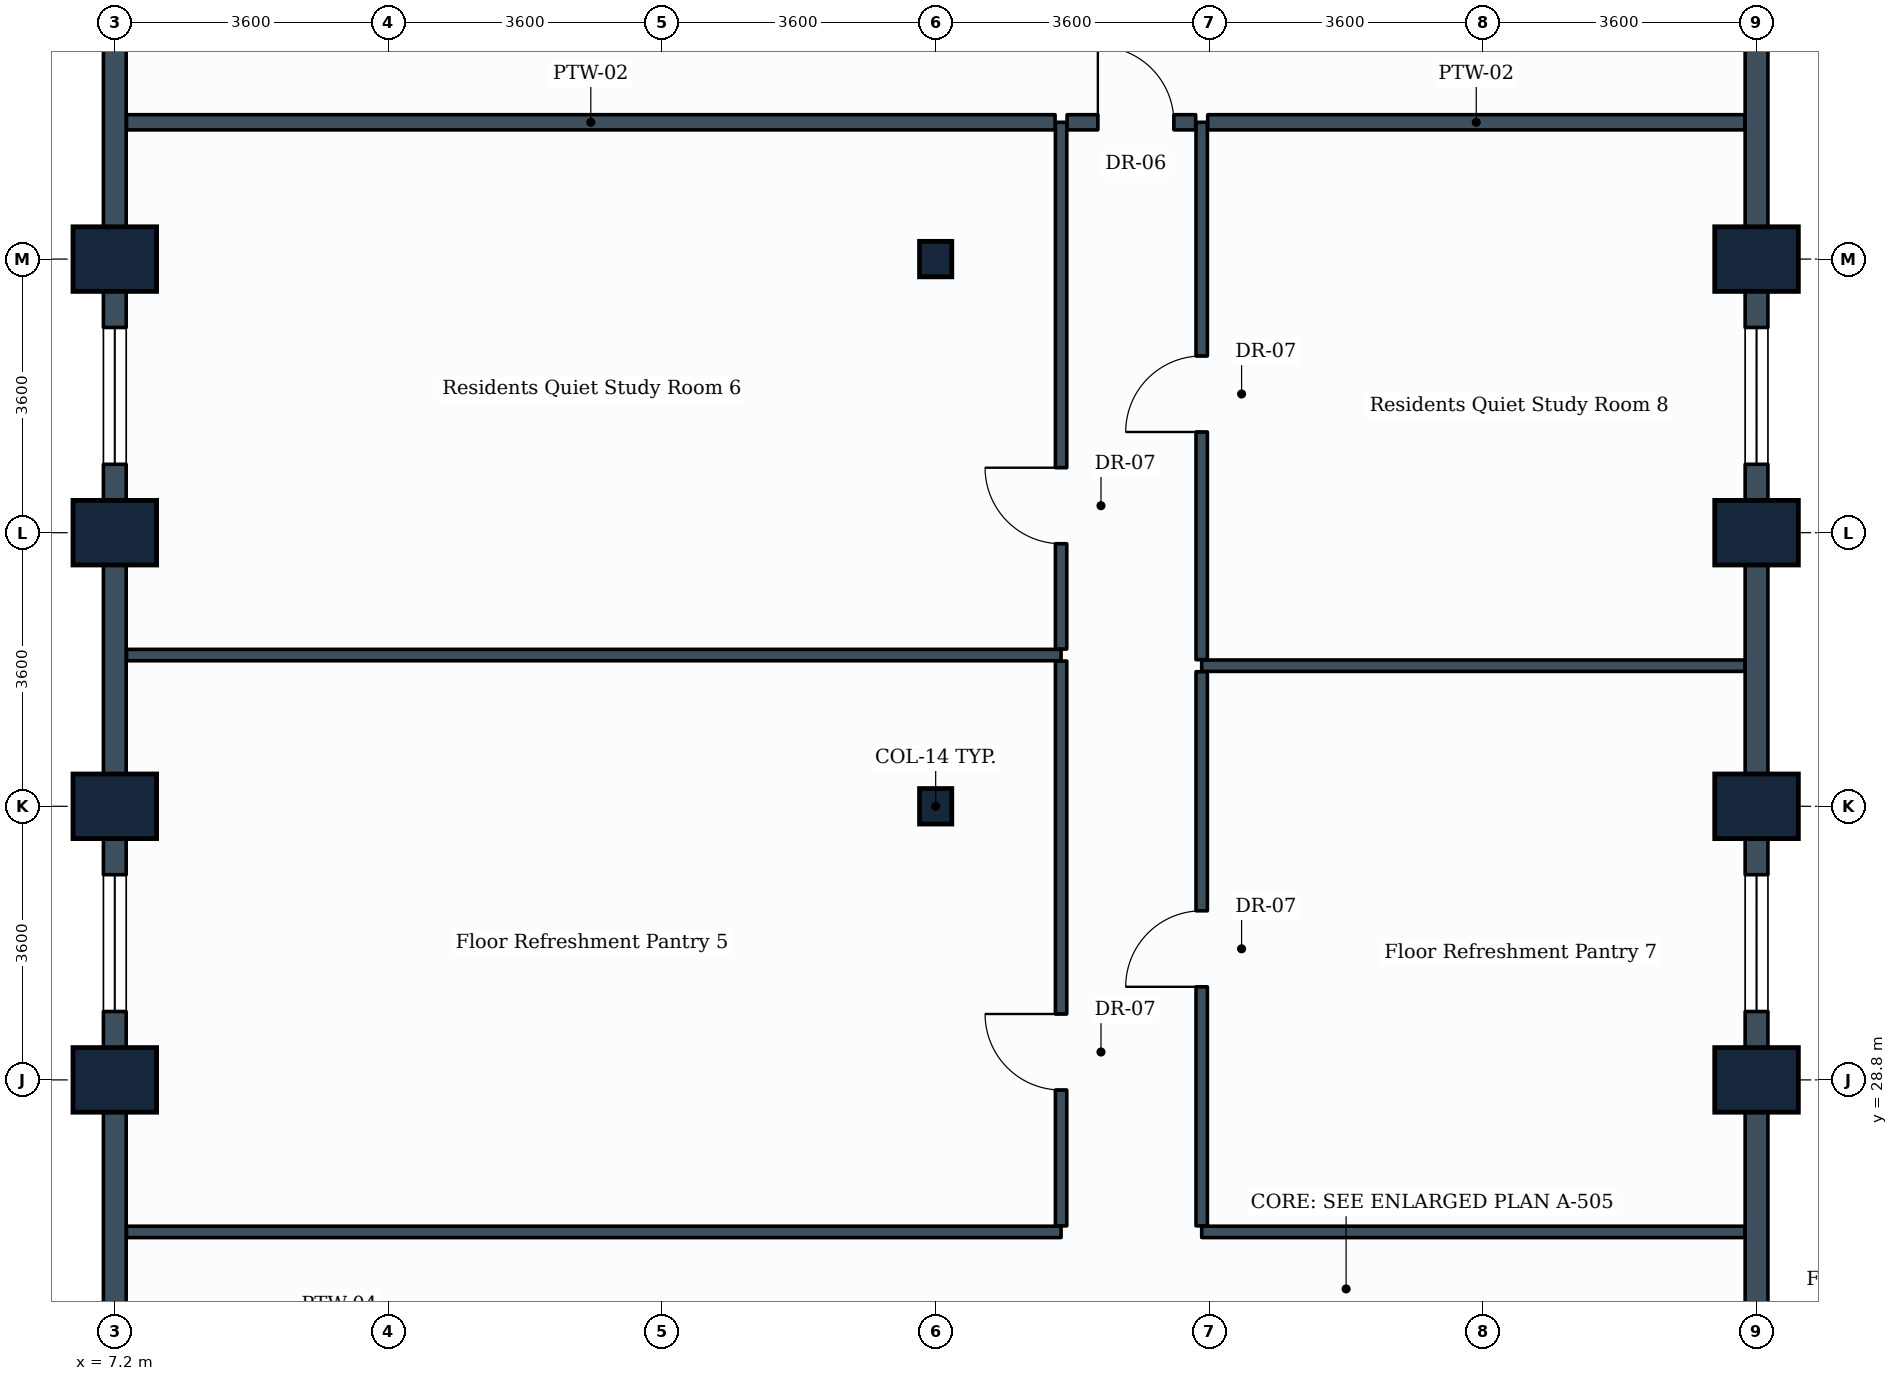
"""IFC4 building model, lengths in metres.
Left out: names, types, materials, properties, quantities, classifications, styles, units other than length and angle.
Written with IfcOpenShell. Run it as: python <this file> out.ifc"""

import sys

from ifc_helpers import new_model, si_unit, direction, frame, frame_2d, origin, origin_2d, place, context, subcontext, project, spatial, rectangle, i_section, extrude, element, fill, save


model = new_model("IFC4")
c1 = context("Model", 3, precision=1e-05, world=origin(), true_north=direction((0.0, 1.0)))
c2 = subcontext(c1, "Body", "Model", "MODEL_VIEW")
j1 = project(units=[si_unit("LENGTHUNIT", "METRE"), si_unit("PLANEANGLEUNIT", "RADIAN")], contexts=[c1])
p1 = place(None, origin())
s1 = spatial("IfcSite", under=j1, at=p1, CompositionType="ELEMENT")
p2 = place(p1, origin())
s2 = spatial("IfcBuilding", under=s1, at=p2, CompositionType="ELEMENT")
p3 = place(p2, frame((0.0, 0.0, 95.7)))
s3 = spatial("IfcBuildingStorey", under=s2, at=p3, CompositionType="ELEMENT", Elevation=95.7)
for number, where, z_axis, x_axis in (
    (1, (7.2, 28.8, 0.0), (0.0, 0.0, 1.0), (0.0, 1.0, 0.0)),
    (2, (7.2, 32.4, 0.0), (0.0, 0.0, 1.0), (0.0, 1.0, 0.0)),
    (3, (7.2, 36.0, 0.0), (0.0, 0.0, 1.0), (0.0, 1.0, 0.0)),
    (4, (7.2, 39.6, 0.0), (0.0, 0.0, 1.0), (0.0, 1.0, 0.0)),
):
    element("IfcColumn", number, at=place(p3, frame(where, z_axis=z_axis, x_axis=x_axis)), inside=s3, PredefinedType="COLUMN", context=c2, shape_type="SweptSolid", body=[
        extrude(rectangle(XDim=0.85, YDim=1.1, at=origin_2d()), origin(), (0.0, 0.0, 1.0), 3.9),
    ])
for number, where, z_axis, x_axis in (
    (5, (18.0, 32.4, 0.0), (0.0, 0.0, 1.0), (1.0, 0.0, 0.0)),
    (6, (18.0, 39.6, 0.0), (0.0, 0.0, 1.0), (1.0, 0.0, 0.0)),
):
    element("IfcColumn", number, at=place(p3, frame(where, z_axis=z_axis, x_axis=x_axis)), inside=s3, PredefinedType="COLUMN", context=c2, shape_type="SweptSolid", body=[
        extrude(i_section(OverallWidth=0.424, OverallDepth=0.467, WebThickness=0.033, FlangeThickness=0.053, FilletRadius=0.015, at=origin_2d()), origin(), (0.0, 0.0, 1.0), 3.9),
    ])
for number, where, z_axis, x_axis in (
    (7, (28.8, 28.8, 0.0), (0.0, 0.0, 1.0), (0.0, 1.0, 0.0)),
    (8, (28.8, 32.4, 0.0), (0.0, 0.0, 1.0), (0.0, 1.0, 0.0)),
    (9, (28.8, 36.0, 0.0), (0.0, 0.0, 1.0), (0.0, 1.0, 0.0)),
    (10, (28.8, 39.6, 0.0), (0.0, 0.0, 1.0), (0.0, 1.0, 0.0)),
):
    element("IfcColumn", number, at=place(p3, frame(where, z_axis=z_axis, x_axis=x_axis)), inside=s3, PredefinedType="COLUMN", context=c2, shape_type="SweptSolid", body=[
        extrude(rectangle(XDim=0.85, YDim=1.1, at=origin_2d()), origin(), (0.0, 0.0, 1.0), 3.9),
    ])
p4 = place(p3, frame((28.8, 28.8, 0.0), z_axis=(0.0, 0.0, 1.0), x_axis=(0.0, -1.0, 0.0)))
e11 = element("IfcWall", 11, at=p4, inside=s3, PredefinedType="STANDARD", context=c2, shape_type="SweptSolid", body=[
    extrude(rectangle(XDim=3.6, YDim=0.3, at=frame_2d((1.8, 0.0))), origin(), (0.0, 0.0, 1.0), 3.19),
])
p5 = place(p3, frame((28.8, 32.4, 0.0), z_axis=(0.0, 0.0, 1.0), x_axis=(0.0, -1.0, 0.0)))
e12 = element("IfcWall", 12, at=p5, inside=s3, PredefinedType="STANDARD", context=c2, shape_type="SweptSolid", body=[
    extrude(rectangle(XDim=3.6, YDim=0.3, at=frame_2d((1.8, 0.0))), origin(), (0.0, 0.0, 1.0), 2.93),
])
p6 = place(p5, frame((0.9, 0.0, 0.85)))
e13 = element("IfcOpeningElement", 13, at=p6, cuts=e12, PredefinedType="OPENING", context=c2, shape_type="SweptSolid", body=[
    extrude(rectangle(XDim=1.8, YDim=1.35, at=frame_2d((0.9, 0.675))), frame((0.0, 0.16, 0.0), z_axis=(0.0, -1.0, 0.0), x_axis=(1.0, 0.0, 0.0)), (0.0, 0.0, 1.0), 0.32),
])
p7 = place(p3, frame((28.8, 36.0, 0.0), z_axis=(0.0, 0.0, 1.0), x_axis=(0.0, -1.0, 0.0)))
e14 = element("IfcWall", 14, at=p7, inside=s3, PredefinedType="STANDARD", context=c2, shape_type="SweptSolid", body=[
    extrude(rectangle(XDim=3.6, YDim=0.3, at=frame_2d((1.8, 0.0))), origin(), (0.0, 0.0, 1.0), 2.93),
])
p8 = place(p3, frame((28.8, 39.6, 0.0), z_axis=(0.0, 0.0, 1.0), x_axis=(0.0, -1.0, 0.0)))
e15 = element("IfcWall", 15, at=p8, inside=s3, PredefinedType="STANDARD", context=c2, shape_type="SweptSolid", body=[
    extrude(rectangle(XDim=3.6, YDim=0.3, at=frame_2d((1.8, 0.0))), origin(), (0.0, 0.0, 1.0), 2.93),
])
p9 = place(p8, frame((0.9, 0.0, 0.85)))
e16 = element("IfcOpeningElement", 16, at=p9, cuts=e15, PredefinedType="OPENING", context=c2, shape_type="SweptSolid", body=[
    extrude(rectangle(XDim=1.8, YDim=1.35, at=frame_2d((0.9, 0.675))), frame((0.0, 0.16, 0.0), z_axis=(0.0, -1.0, 0.0), x_axis=(1.0, 0.0, 0.0)), (0.0, 0.0, 1.0), 0.32),
])
for number, where, z_axis, x_axis in (
    (17, (28.8, 43.2, 0.0), (0.0, 0.0, 1.0), (0.0, -1.0, 0.0)),
    (18, (7.2, 39.6, 0.0), (0.0, 0.0, 1.0), (0.0, 1.0, 0.0)),
):
    element("IfcWall", number, at=place(p3, frame(where, z_axis=z_axis, x_axis=x_axis)), inside=s3, PredefinedType="STANDARD", context=c2, shape_type="SweptSolid", body=[
        extrude(rectangle(XDim=3.6, YDim=0.3, at=frame_2d((1.8, 0.0))), origin(), (0.0, 0.0, 1.0), 2.93),
    ])
p10 = place(p3, frame((7.2, 36.0, 0.0), z_axis=(0.0, 0.0, 1.0), x_axis=(0.0, 1.0, 0.0)))
e19 = element("IfcWall", 19, at=p10, inside=s3, PredefinedType="STANDARD", context=c2, shape_type="SweptSolid", body=[
    extrude(rectangle(XDim=3.6, YDim=0.3, at=frame_2d((1.8, 0.0))), origin(), (0.0, 0.0, 1.0), 2.93),
])
p11 = place(p10, frame((0.9, 0.0, 0.85)))
e20 = element("IfcOpeningElement", 20, at=p11, cuts=e19, PredefinedType="OPENING", context=c2, shape_type="SweptSolid", body=[
    extrude(rectangle(XDim=1.8, YDim=1.35, at=frame_2d((0.9, 0.675))), frame((0.0, 0.16, 0.0), z_axis=(0.0, -1.0, 0.0), x_axis=(1.0, 0.0, 0.0)), (0.0, 0.0, 1.0), 0.32),
])
p12 = place(p3, frame((7.2, 32.4, 0.0), z_axis=(0.0, 0.0, 1.0), x_axis=(0.0, 1.0, 0.0)))
e21 = element("IfcWall", 21, at=p12, inside=s3, PredefinedType="STANDARD", context=c2, shape_type="SweptSolid", body=[
    extrude(rectangle(XDim=3.6, YDim=0.3, at=frame_2d((1.8, 0.0))), origin(), (0.0, 0.0, 1.0), 2.93),
])
p13 = place(p3, frame((7.2, 28.8, 0.0), z_axis=(0.0, 0.0, 1.0), x_axis=(0.0, 1.0, 0.0)))
e22 = element("IfcWall", 22, at=p13, inside=s3, PredefinedType="STANDARD", context=c2, shape_type="SweptSolid", body=[
    extrude(rectangle(XDim=3.6, YDim=0.3, at=frame_2d((1.8, 0.0))), origin(), (0.0, 0.0, 1.0), 2.93),
])
p14 = place(p13, frame((0.9, 0.0, 0.85)))
e23 = element("IfcOpeningElement", 23, at=p14, cuts=e22, PredefinedType="OPENING", context=c2, shape_type="SweptSolid", body=[
    extrude(rectangle(XDim=1.8, YDim=1.35, at=frame_2d((0.9, 0.675))), frame((0.0, 0.16, 0.0), z_axis=(0.0, -1.0, 0.0), x_axis=(1.0, 0.0, 0.0)), (0.0, 0.0, 1.0), 0.32),
])
p15 = place(p3, frame((7.2, 25.2, 0.0), z_axis=(0.0, 0.0, 1.0), x_axis=(0.0, 1.0, 0.0)))
e24 = element("IfcWall", 24, at=p15, inside=s3, PredefinedType="STANDARD", context=c2, shape_type="SweptSolid", body=[
    extrude(rectangle(XDim=3.6, YDim=0.3, at=frame_2d((1.8, 0.0))), origin(), (0.0, 0.0, 1.0), 2.93),
])
for number, where, z_axis, x_axis in (
    (25, (7.354, 26.8, 0.0), (0.0, 0.0, 1.0), (1.0, 0.0, 0.0)),
    (26, (7.354, 34.39, 0.0), (0.0, 0.0, 1.0), (1.0, 0.0, 0.0)),
):
    element("IfcWall", number, at=place(p3, frame(where, z_axis=z_axis, x_axis=x_axis)), inside=s3, PredefinedType="PARTITIONING", context=c2, shape_type="SweptSolid", body=[
        extrude(rectangle(XDim=12.296, YDim=0.15, at=frame_2d((6.148, 0.0))), origin(), (0.0, 0.0, 1.0), 2.93),
    ])
p16 = place(p3, frame((19.65, 26.879, 0.0), z_axis=(0.0, 0.0, 1.0), x_axis=(0.0, 1.0, 0.0)))
e27 = element("IfcWall", 27, at=p16, inside=s3, PredefinedType="PARTITIONING", context=c2, shape_type="SweptSolid", body=[
    extrude(rectangle(XDim=7.432, YDim=0.15, at=frame_2d((3.716, 0.0))), origin(), (0.0, 0.0, 1.0), 3.19),
])
p17 = place(p16, frame((1.788, 0.0, 0.0)))
e28 = element("IfcOpeningElement", 28, at=p17, cuts=e27, PredefinedType="OPENING", context=c2, shape_type="SweptSolid", body=[
    extrude(rectangle(XDim=1.0, YDim=2.1, at=frame_2d((0.5, 1.05))), frame((0.0, 0.085, 0.0), z_axis=(0.0, -1.0, 0.0), x_axis=(1.0, 0.0, 0.0)), (0.0, 0.0, 1.0), 0.17),
])
p18 = place(p3, frame((19.65, 34.469, 0.0), z_axis=(0.0, 0.0, 1.0), x_axis=(0.0, 1.0, 0.0)))
e29 = element("IfcWall", 29, at=p18, inside=s3, PredefinedType="PARTITIONING", context=c2, shape_type="SweptSolid", body=[
    extrude(rectangle(XDim=6.931, YDim=0.15, at=frame_2d((3.465, 0.0))), origin(), (0.0, 0.0, 1.0), 3.19),
])
p19 = place(p18, frame((1.386, 0.0, 0.0)))
e30 = element("IfcOpeningElement", 30, at=p19, cuts=e29, PredefinedType="OPENING", context=c2, shape_type="SweptSolid", body=[
    extrude(rectangle(XDim=1.0, YDim=2.1, at=frame_2d((0.5, 1.05))), frame((0.0, 0.085, 0.0), z_axis=(0.0, -1.0, 0.0), x_axis=(1.0, 0.0, 0.0)), (0.0, 0.0, 1.0), 0.17),
])
p20 = place(p3, frame((21.5, 26.8, 0.0), z_axis=(0.0, 0.0, 1.0), x_axis=(1.0, 0.0, 0.0)))
e31 = element("IfcWall", 31, at=p20, inside=s3, PredefinedType="PARTITIONING", context=c2, shape_type="SweptSolid", body=[
    extrude(rectangle(XDim=7.146, YDim=0.15, at=frame_2d((3.573, 0.0))), origin(), (0.0, 0.0, 1.0), 3.635),
])
p21 = place(p3, frame((21.5, 34.25, 0.0), z_axis=(0.0, 0.0, 1.0), x_axis=(1.0, 0.0, 0.0)))
e32 = element("IfcWall", 32, at=p21, inside=s3, PredefinedType="PARTITIONING", context=c2, shape_type="SweptSolid", body=[
    extrude(rectangle(XDim=7.146, YDim=0.15, at=frame_2d((3.573, 0.0))), origin(), (0.0, 0.0, 1.0), 2.93),
])
p22 = place(p3, frame((21.5, 26.879, 0.0), z_axis=(0.0, 0.0, 1.0), x_axis=(0.0, 1.0, 0.0)))
e33 = element("IfcWall", 33, at=p22, inside=s3, PredefinedType="PARTITIONING", context=c2, shape_type="SweptSolid", body=[
    extrude(rectangle(XDim=7.292, YDim=0.15, at=frame_2d((3.646, 0.0))), origin(), (0.0, 0.0, 1.0), 3.19),
])
p23 = place(p22, frame((3.146, 0.0, 0.0)))
e34 = element("IfcOpeningElement", 34, at=p23, cuts=e33, PredefinedType="OPENING", context=c2, shape_type="SweptSolid", body=[
    extrude(rectangle(XDim=1.0, YDim=2.1, at=frame_2d((0.5, 1.05))), frame((0.0, 0.085, 0.0), z_axis=(0.0, -1.0, 0.0), x_axis=(1.0, 0.0, 0.0)), (0.0, 0.0, 1.0), 0.17),
])
p24 = place(p3, frame((21.5, 34.329, 0.0), z_axis=(0.0, 0.0, 1.0), x_axis=(0.0, 1.0, 0.0)))
e35 = element("IfcWall", 35, at=p24, inside=s3, PredefinedType="PARTITIONING", context=c2, shape_type="SweptSolid", body=[
    extrude(rectangle(XDim=7.071, YDim=0.15, at=frame_2d((3.535, 0.0))), origin(), (0.0, 0.0, 1.0), 3.18),
])
p25 = place(p24, frame((2.996, 0.0, 0.0)))
e36 = element("IfcOpeningElement", 36, at=p25, cuts=e35, PredefinedType="OPENING", context=c2, shape_type="SweptSolid", body=[
    extrude(rectangle(XDim=1.0, YDim=2.1, at=frame_2d((0.5, 1.05))), frame((0.0, 0.085, 0.0), z_axis=(0.0, -1.0, 0.0), x_axis=(1.0, 0.0, 0.0)), (0.0, 0.0, 1.0), 0.17),
])
p26 = place(p3, frame((7.354, 41.4, 0.0), z_axis=(0.0, 0.0, 1.0), x_axis=(1.0, 0.0, 0.0)))
e37 = element("IfcWall", 37, at=p26, inside=s3, PredefinedType="PARTITIONING", context=c2, shape_type="SweptSolid", body=[
    extrude(rectangle(XDim=12.217, YDim=0.2, at=frame_2d((6.108, 0.0))), origin(), (0.0, 0.0, 1.0), 2.93),
])
p27 = place(p3, frame((21.579, 41.4, 0.0), z_axis=(0.0, 0.0, 1.0), x_axis=(1.0, 0.0, 0.0)))
e38 = element("IfcWall", 38, at=p27, inside=s3, PredefinedType="PARTITIONING", context=c2, shape_type="SweptSolid", body=[
    extrude(rectangle(XDim=7.067, YDim=0.2, at=frame_2d((3.533, 0.0))), origin(), (0.0, 0.0, 1.0), 2.93),
])
p28 = place(p3, frame((19.729, 41.4, 0.0), z_axis=(0.0, 0.0, 1.0), x_axis=(1.0, 0.0, 0.0)))
e39 = element("IfcWall", 39, at=p28, inside=s3, PredefinedType="PARTITIONING", context=c2, shape_type="SweptSolid", body=[
    extrude(rectangle(XDim=1.692, YDim=0.2, at=frame_2d((0.846, 0.0))), origin(), (0.0, 0.0, 1.0), 3.635),
])
p29 = place(p28, frame((0.405, 0.0, 0.0)))
e40 = element("IfcOpeningElement", 40, at=p29, cuts=e39, PredefinedType="OPENING", context=c2, shape_type="SweptSolid", body=[
    extrude(rectangle(XDim=1.0, YDim=2.1, at=frame_2d((0.5, 1.05))), frame((0.0, 0.11, 0.0), z_axis=(0.0, -1.0, 0.0), x_axis=(1.0, 0.0, 0.0)), (0.0, 0.0, 1.0), 0.22),
])
p30 = place(p6, origin())
e41 = element("IfcWindow", 41, at=p30, inside=s3, PartitioningType="SINGLE_PANEL", PredefinedType="WINDOW", context=c2, shape_type="SweptSolid", body=[
    extrude(rectangle(XDim=1.8, YDim=1.35, at=frame_2d((0.9, 0.675))), frame((0.0, 0.03, 0.0), z_axis=(0.0, -1.0, 0.0), x_axis=(1.0, 0.0, 0.0)), (0.0, 0.0, 1.0), 0.06),
])
fill(e13, e41)
p31 = place(p9, origin())
e42 = element("IfcWindow", 42, at=p31, inside=s3, PartitioningType="SINGLE_PANEL", PredefinedType="WINDOW", context=c2, shape_type="SweptSolid", body=[
    extrude(rectangle(XDim=1.8, YDim=1.35, at=frame_2d((0.9, 0.675))), frame((0.0, 0.03, 0.0), z_axis=(0.0, -1.0, 0.0), x_axis=(1.0, 0.0, 0.0)), (0.0, 0.0, 1.0), 0.06),
])
fill(e16, e42)
p32 = place(p11, origin())
e43 = element("IfcWindow", 43, at=p32, inside=s3, PartitioningType="SINGLE_PANEL", PredefinedType="WINDOW", context=c2, shape_type="SweptSolid", body=[
    extrude(rectangle(XDim=1.8, YDim=1.35, at=frame_2d((0.9, 0.675))), frame((0.0, 0.03, 0.0), z_axis=(0.0, -1.0, 0.0), x_axis=(1.0, 0.0, 0.0)), (0.0, 0.0, 1.0), 0.06),
])
fill(e20, e43)
p33 = place(p14, origin())
e44 = element("IfcWindow", 44, at=p33, inside=s3, PartitioningType="SINGLE_PANEL", PredefinedType="WINDOW", context=c2, shape_type="SweptSolid", body=[
    extrude(rectangle(XDim=1.8, YDim=1.35, at=frame_2d((0.9, 0.675))), frame((0.0, 0.03, 0.0), z_axis=(0.0, -1.0, 0.0), x_axis=(1.0, 0.0, 0.0)), (0.0, 0.0, 1.0), 0.06),
])
fill(e23, e44)
p34 = place(p17, origin())
e45 = element("IfcDoor", 45, at=p34, inside=s3, OperationType="SINGLE_SWING_RIGHT", PredefinedType="DOOR", context=c2, shape_type="SweptSolid", body=[
    extrude(rectangle(XDim=1.0, YDim=2.1, at=frame_2d((0.5, 1.05))), frame((0.0, 0.025, 0.0), z_axis=(0.0, -1.0, 0.0), x_axis=(1.0, 0.0, 0.0)), (0.0, 0.0, 1.0), 0.05),
])
fill(e28, e45)
p35 = place(p19, origin())
e46 = element("IfcDoor", 46, at=p35, inside=s3, OperationType="SINGLE_SWING_RIGHT", PredefinedType="DOOR", context=c2, shape_type="SweptSolid", body=[
    extrude(rectangle(XDim=1.0, YDim=2.1, at=frame_2d((0.5, 1.05))), frame((0.0, 0.025, 0.0), z_axis=(0.0, -1.0, 0.0), x_axis=(1.0, 0.0, 0.0)), (0.0, 0.0, 1.0), 0.05),
])
fill(e30, e46)
p36 = place(p23, origin())
e47 = element("IfcDoor", 47, at=p36, inside=s3, OperationType="SINGLE_SWING_LEFT", PredefinedType="DOOR", context=c2, shape_type="SweptSolid", body=[
    extrude(rectangle(XDim=1.0, YDim=2.1, at=frame_2d((0.5, 1.05))), frame((0.0, 0.025, 0.0), z_axis=(0.0, -1.0, 0.0), x_axis=(1.0, 0.0, 0.0)), (0.0, 0.0, 1.0), 0.05),
])
fill(e34, e47)
p37 = place(p25, origin())
e48 = element("IfcDoor", 48, at=p37, inside=s3, OperationType="SINGLE_SWING_LEFT", PredefinedType="DOOR", context=c2, shape_type="SweptSolid", body=[
    extrude(rectangle(XDim=1.0, YDim=2.1, at=frame_2d((0.5, 1.05))), frame((0.0, 0.025, 0.0), z_axis=(0.0, -1.0, 0.0), x_axis=(1.0, 0.0, 0.0)), (0.0, 0.0, 1.0), 0.05),
])
fill(e36, e48)
p38 = place(p29, origin())
e49 = element("IfcDoor", 49, at=p38, inside=s3, OperationType="SINGLE_SWING_LEFT", PredefinedType="DOOR", context=c2, shape_type="SweptSolid", body=[
    extrude(rectangle(XDim=1.0, YDim=2.1, at=frame_2d((0.5, 1.05))), frame((0.0, 0.025, 0.0), z_axis=(0.0, -1.0, 0.0), x_axis=(1.0, 0.0, 0.0)), (0.0, 0.0, 1.0), 0.05),
])
fill(e40, e49)
save(model, sys.argv[1])
